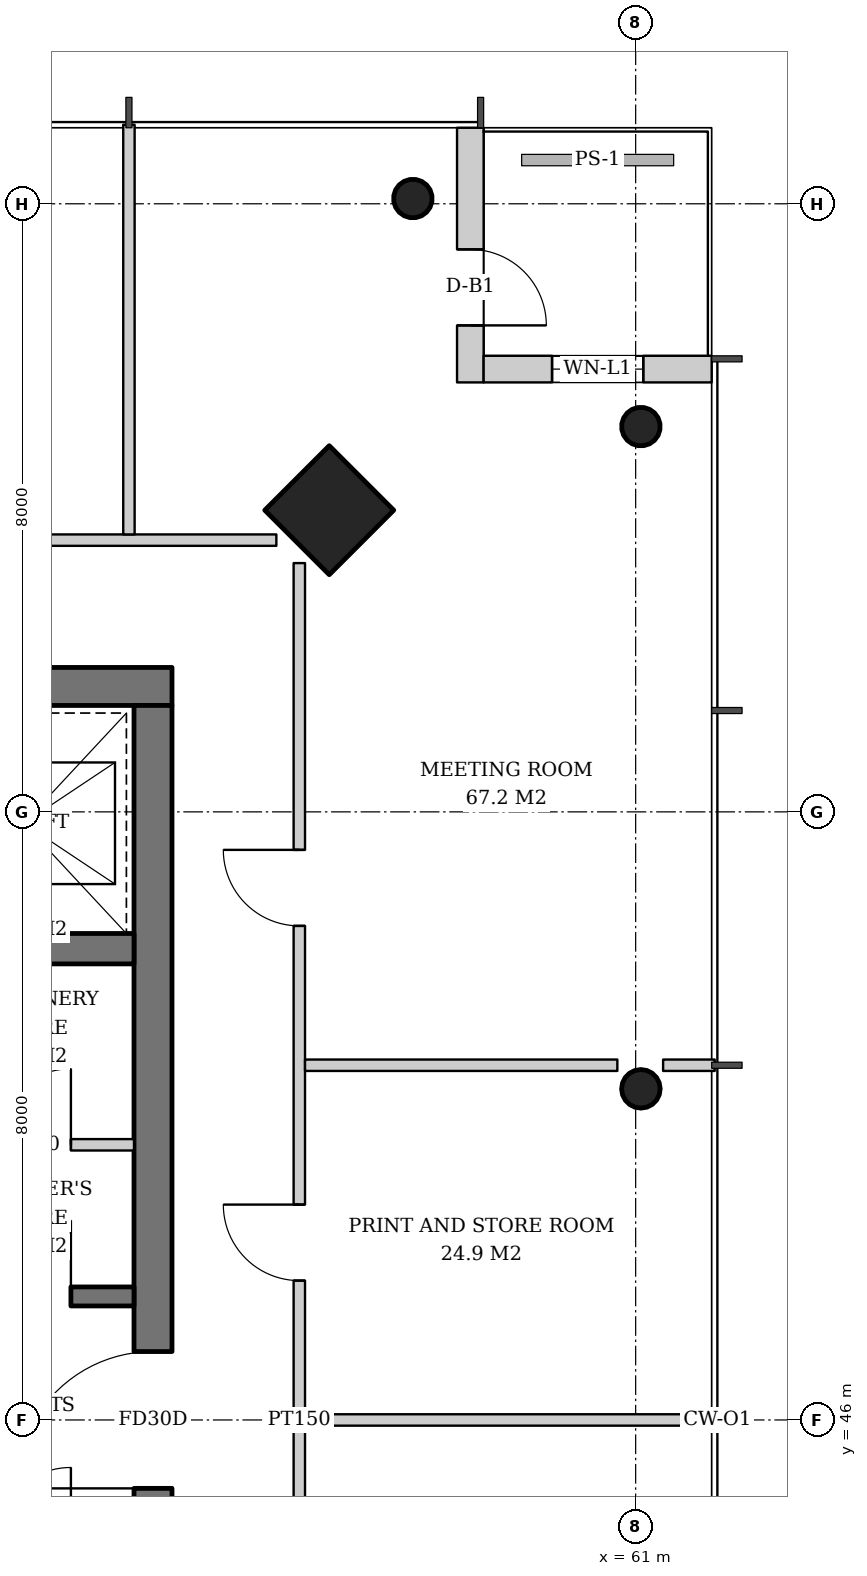
"""IFC4 building model, lengths in metres.
Left out: names, types, materials, properties, quantities, classifications, styles, units other than length and angle.
Written with IfcOpenShell. Run it as: python <this file> out.ifc"""

import sys

from ifc_helpers import new_model, si_unit, direction, frame, frame_2d, origin, origin_2d, place, context, subcontext, project, spatial, rectangle, hollow_circle, extrude, element, fill, save


model = new_model("IFC4")
c1 = context("Model", 3, precision=1e-05, world=origin(), true_north=direction((0.0, 1.0)))
c2 = subcontext(c1, "Body", "Model", "MODEL_VIEW")
j1 = project(units=[si_unit("LENGTHUNIT", "METRE"), si_unit("PLANEANGLEUNIT", "RADIAN")], contexts=[c1])
p1 = place(None, origin())
s1 = spatial("IfcSite", under=j1, at=p1, CompositionType="ELEMENT")
p2 = place(p1, origin())
s2 = spatial("IfcBuilding", under=s1, at=p2, CompositionType="ELEMENT")
p3 = place(p2, frame((0.0, 0.0, 268.0)))
s3 = spatial("IfcBuildingStorey", under=s2, at=p3, CompositionType="ELEMENT", Elevation=268.0)
p4 = place(p3, frame((57.007, 58.007, 0.0), z_axis=(-0.031898107953, -0.031898107953, 0.998981992539), x_axis=(0.707106781187, -0.707106781187, 0.0)))
e1 = element("IfcColumn", 1, at=p4, inside=s3, PredefinedType="COLUMN", context=c2, shape_type="SweptSolid", body=[
    extrude(rectangle(XDim=1.2, YDim=1.2, at=origin_2d()), origin(), (0.0, 0.0, 1.0), 3.804),
])
p5 = place(p3, frame((61.107, 59.107, 0.0), z_axis=(-0.031962158256, -0.031962158256, 0.998977898093), x_axis=(0.707106781187, -0.707106781187, 0.0)))
e2 = element("IfcColumn", 2, at=p5, inside=s3, PredefinedType="COLUMN", context=c2, shape_type="SweptSolid", body=[
    extrude(hollow_circle(Radius=0.254, WallThickness=0.02, at=origin_2d()), origin(), (0.0, 0.0, 1.0), 3.804),
])
p6 = place(p3, frame((61.107, 50.369, 0.0), z_axis=(-0.031976680097, -0.010658893366, 0.999431778523), x_axis=(0.316227766017, -0.948683298051, 0.0)))
e3 = element("IfcColumn", 3, at=p6, inside=s3, PredefinedType="COLUMN", context=c2, shape_type="SweptSolid", body=[
    extrude(hollow_circle(Radius=0.254, WallThickness=0.02, at=origin_2d()), origin(), (0.0, 0.0, 1.0), 3.802),
])
p7 = place(p3, frame((58.107, 62.107, 0.0), z_axis=(-0.031962158256, -0.031962158256, 0.998977898093), x_axis=(0.707106781187, -0.707106781187, 0.0)))
e4 = element("IfcColumn", 4, at=p7, inside=s3, PredefinedType="COLUMN", context=c2, shape_type="SweptSolid", body=[
    extrude(hollow_circle(Radius=0.254, WallThickness=0.02, at=origin_2d()), origin(), (0.0, 0.0, 1.0), 3.804),
])
p8 = place(p3, frame((35.1, 55.65, 0.0), z_axis=(0.0, 0.0, 1.0), x_axis=(1.0, 0.0, 0.0)))
e5 = element("IfcWall", 5, at=p8, inside=s3, PredefinedType="SHEAR", context=c2, shape_type="SweptSolid", body=[
    extrude(rectangle(XDim=19.8, YDim=0.5, at=frame_2d((9.9, 0.0))), origin(), (0.0, 0.0, 1.0), 3.8),
])
p9 = place(p8, frame((14.54, 0.0, 0.0)))
e6 = element("IfcOpeningElement", 6, at=p9, cuts=e5, PredefinedType="OPENING", context=c2, shape_type="SweptSolid", body=[
    extrude(rectangle(XDim=1.0, YDim=2.1, at=frame_2d((0.5, 1.05))), frame((0.0, 0.26, 0.0), z_axis=(0.0, -1.0, 0.0), x_axis=(1.0, 0.0, 0.0)), (0.0, 0.0, 1.0), 0.52),
])
p10 = place(p8, frame((1.75, 0.0, 0.0)))
e7 = element("IfcOpeningElement", 7, at=p10, cuts=e5, PredefinedType="OPENING", context=c2, shape_type="SweptSolid", body=[
    extrude(rectangle(XDim=1.0, YDim=2.1, at=frame_2d((0.5, 1.05))), frame((0.0, 0.26, 0.0), z_axis=(0.0, -1.0, 0.0), x_axis=(1.0, 0.0, 0.0)), (0.0, 0.0, 1.0), 0.52),
])
p11 = place(p8, frame((3.705, 0.0, 0.0)))
e8 = element("IfcOpeningElement", 8, at=p11, cuts=e5, PredefinedType="OPENING", context=c2, shape_type="SweptSolid", body=[
    extrude(rectangle(XDim=1.0, YDim=2.1, at=frame_2d((0.5, 1.05))), frame((0.0, 0.26, 0.0), z_axis=(0.0, -1.0, 0.0), x_axis=(1.0, 0.0, 0.0)), (0.0, 0.0, 1.0), 0.52),
])
p12 = place(p3, frame((54.65, 36.6, 0.0), z_axis=(0.0, 0.0, 1.0), x_axis=(0.0, 1.0, 0.0)))
e9 = element("IfcWall", 9, at=p12, inside=s3, PredefinedType="SHEAR", context=c2, shape_type="SweptSolid", body=[
    extrude(rectangle(XDim=18.8, YDim=0.5, at=frame_2d((9.4, 0.0))), origin(), (0.0, 0.0, 1.0), 3.8),
])
p13 = place(p12, frame((8.5, 0.0, 0.0)))
e10 = element("IfcOpeningElement", 10, at=p13, cuts=e9, PredefinedType="OPENING", context=c2, shape_type="SweptSolid", body=[
    extrude(rectangle(XDim=1.8, YDim=2.4, at=frame_2d((0.9, 1.2))), frame((0.0, 0.26, 0.0), z_axis=(0.0, -1.0, 0.0), x_axis=(1.0, 0.0, 0.0)), (0.0, 0.0, 1.0), 0.52),
])
p14 = place(p3, frame((35.6, 52.2, 0.0), z_axis=(0.0, 0.0, 1.0), x_axis=(1.0, 0.0, 0.0)))
e11 = element("IfcWall", 11, at=p14, inside=s3, PredefinedType="SHEAR", context=c2, shape_type="SweptSolid", body=[
    extrude(rectangle(XDim=18.8, YDim=0.4, at=frame_2d((9.4, 0.0))), origin(), (0.0, 0.0, 1.0), 3.8),
])
p15 = place(p3, frame((58.825, 63.0, 0.0), z_axis=(0.0, 0.0, 1.0), x_axis=(0.0, -1.0, 0.0)))
e12 = element("IfcWall", 12, at=p15, inside=s3, PredefinedType="SOLIDWALL", context=c2, shape_type="SweptSolid", body=[
    extrude(rectangle(XDim=3.35, YDim=0.35, at=frame_2d((1.675, 0.0))), origin(), (0.0, 0.0, 1.0), 3.62),
])
p16 = place(p15, frame((1.6, 0.0, 0.0)))
e13 = element("IfcOpeningElement", 13, at=p16, cuts=e12, PredefinedType="OPENING", context=c2, shape_type="SweptSolid", body=[
    extrude(rectangle(XDim=1.0, YDim=2.4, at=frame_2d((0.5, 1.2))), frame((0.0, 0.185, 0.0), z_axis=(0.0, -1.0, 0.0), x_axis=(1.0, 0.0, 0.0)), (0.0, 0.0, 1.0), 0.37),
])
p17 = place(p3, frame((59.0, 59.825, 0.0), z_axis=(0.0, 0.0, 1.0), x_axis=(1.0, 0.0, 0.0)))
e14 = element("IfcWall", 14, at=p17, inside=s3, PredefinedType="SOLIDWALL", context=c2, shape_type="SweptSolid", body=[
    extrude(rectangle(XDim=3.0, YDim=0.35, at=frame_2d((1.5, 0.0))), origin(), (0.0, 0.0, 1.0), 3.62),
])
p18 = place(p17, frame((0.9, 0.0, 0.6)))
e15 = element("IfcOpeningElement", 15, at=p18, cuts=e14, PredefinedType="OPENING", context=c2, shape_type="SweptSolid", body=[
    extrude(rectangle(XDim=1.2, YDim=2.55, at=frame_2d((0.6, 1.275))), frame((0.0, 0.185, 0.0), z_axis=(0.0, -1.0, 0.0), x_axis=(1.0, 0.0, 0.0)), (0.0, 0.0, 1.0), 0.37),
])
p19 = place(p3, frame((48.93, 47.625, 0.0), z_axis=(0.0, 0.0, 1.0), x_axis=(1.0, 0.0, 0.0)))
e16 = element("IfcWall", 16, at=p19, inside=s3, PredefinedType="SHEAR", context=c2, shape_type="SweptSolid", body=[
    extrude(rectangle(XDim=5.47, YDim=0.25, at=frame_2d((2.735, 0.0))), origin(), (0.0, 0.0, 1.0), 3.8),
])
p20 = place(p19, frame((0.78, 0.0, 0.0)))
e17 = element("IfcOpeningElement", 17, at=p20, cuts=e16, PredefinedType="OPENING", context=c2, shape_type="SweptSolid", body=[
    extrude(rectangle(XDim=1.0, YDim=2.1, at=frame_2d((0.5, 1.05))), frame((0.0, 0.135, 0.0), z_axis=(0.0, -1.0, 0.0), x_axis=(1.0, 0.0, 0.0)), (0.0, 0.0, 1.0), 0.27),
])
p21 = place(p19, frame((3.64, 0.0, 0.0)))
e18 = element("IfcOpeningElement", 18, at=p21, cuts=e16, PredefinedType="OPENING", context=c2, shape_type="SweptSolid", body=[
    extrude(rectangle(XDim=1.0, YDim=2.1, at=frame_2d((0.5, 1.05))), frame((0.0, 0.135, 0.0), z_axis=(0.0, -1.0, 0.0), x_axis=(1.0, 0.0, 0.0)), (0.0, 0.0, 1.0), 0.27),
])
p22 = place(p3, frame((51.74, 49.62, 0.0), z_axis=(0.0, 0.0, 1.0), x_axis=(1.0, 0.0, 0.0)))
e19 = element("IfcWall", 19, at=p22, inside=s3, PredefinedType="SOLIDWALL", context=c2, shape_type="SweptSolid", body=[
    extrude(rectangle(XDim=2.66, YDim=0.15, at=frame_2d((1.33, 0.0))), origin(), (0.0, 0.0, 1.0), 3.62),
])
p23 = place(p22, frame((0.83, 0.0, 0.0)))
e20 = element("IfcOpeningElement", 20, at=p23, cuts=e19, PredefinedType="OPENING", context=c2, shape_type="SweptSolid", body=[
    extrude(rectangle(XDim=1.0, YDim=2.1, at=frame_2d((0.5, 1.05))), frame((0.0, 0.085, 0.0), z_axis=(0.0, -1.0, 0.0), x_axis=(1.0, 0.0, 0.0)), (0.0, 0.0, 1.0), 0.17),
])
p24 = place(p3, frame((56.575, 34.727, 0.0), z_axis=(0.0, 0.0, 1.0), x_axis=(0.0, 1.0, 0.0)))
e21 = element("IfcWall", 21, at=p24, inside=s3, PredefinedType="PARTITIONING", context=c2, shape_type="SweptSolid", body=[
    extrude(rectangle(XDim=22.546, YDim=0.15, at=frame_2d((11.273, 0.0))), origin(), (0.0, 0.0, 1.0), 3.02),
])
p25 = place(p24, frame((3.773, 0.0, 0.0)))
e22 = element("IfcOpeningElement", 22, at=p25, cuts=e21, PredefinedType="OPENING", context=c2, shape_type="SweptSolid", body=[
    extrude(rectangle(XDim=1.0, YDim=2.1, at=frame_2d((0.5, 1.05))), frame((0.0, 0.085, 0.0), z_axis=(0.0, -1.0, 0.0), x_axis=(1.0, 0.0, 0.0)), (0.0, 0.0, 1.0), 0.17),
])
p26 = place(p24, frame((8.439, 0.0, 0.0)))
e23 = element("IfcOpeningElement", 23, at=p26, cuts=e21, PredefinedType="OPENING", context=c2, shape_type="SweptSolid", body=[
    extrude(rectangle(XDim=1.0, YDim=2.1, at=frame_2d((0.5, 1.05))), frame((0.0, 0.085, 0.0), z_axis=(0.0, -1.0, 0.0), x_axis=(1.0, 0.0, 0.0)), (0.0, 0.0, 1.0), 0.17),
])
p27 = place(p24, frame((13.106, 0.0, 0.0)))
e24 = element("IfcOpeningElement", 24, at=p27, cuts=e21, PredefinedType="OPENING", context=c2, shape_type="SweptSolid", body=[
    extrude(rectangle(XDim=1.0, YDim=2.1, at=frame_2d((0.5, 1.05))), frame((0.0, 0.085, 0.0), z_axis=(0.0, -1.0, 0.0), x_axis=(1.0, 0.0, 0.0)), (0.0, 0.0, 1.0), 0.17),
])
p28 = place(p24, frame((17.773, 0.0, 0.0)))
e25 = element("IfcOpeningElement", 25, at=p28, cuts=e21, PredefinedType="OPENING", context=c2, shape_type="SweptSolid", body=[
    extrude(rectangle(XDim=1.0, YDim=2.1, at=frame_2d((0.5, 1.05))), frame((0.0, 0.085, 0.0), z_axis=(0.0, -1.0, 0.0), x_axis=(1.0, 0.0, 0.0)), (0.0, 0.0, 1.0), 0.17),
])
p29 = place(p3, frame((56.65, 46.0, 0.0), z_axis=(0.0, 0.0, 1.0), x_axis=(1.0, 0.0, 0.0)))
e26 = element("IfcWall", 26, at=p29, inside=s3, PredefinedType="PARTITIONING", context=c2, shape_type="SweptSolid", body=[
    extrude(rectangle(XDim=5.39, YDim=0.15, at=frame_2d((2.695, 0.0))), origin(), (0.0, 0.0, 1.0), 3.12),
])
p30 = place(p3, frame((56.65, 50.667, 0.0), z_axis=(0.0, 0.0, 1.0), x_axis=(1.0, 0.0, 0.0)))
e27 = element("IfcWall", 27, at=p30, inside=s3, PredefinedType="PARTITIONING", context=c2, shape_type="SweptSolid", body=[
    extrude(rectangle(XDim=4.109, YDim=0.15, at=frame_2d((2.055, 0.0))), origin(), (0.0, 0.0, 1.0), 3.62),
])
p31 = place(p3, frame((61.361, 50.667, 0.0), z_axis=(0.0, 0.0, 1.0), x_axis=(1.0, 0.0, 0.0)))
e28 = element("IfcWall", 28, at=p31, inside=s3, PredefinedType="PARTITIONING", context=c2, shape_type="SweptSolid", body=[
    extrude(rectangle(XDim=0.679, YDim=0.15, at=frame_2d((0.339, 0.0))), origin(), (0.0, 0.0, 1.0), 3.62),
])
p32 = place(p3, frame((56.273, 57.575, 0.0), z_axis=(0.0, 0.0, 1.0), x_axis=(-1.0, 0.0, 0.0)))
e29 = element("IfcWall", 29, at=p32, inside=s3, PredefinedType="PARTITIONING", context=c2, shape_type="SweptSolid", body=[
    extrude(rectangle(XDim=22.546, YDim=0.15, at=frame_2d((11.273, 0.0))), origin(), (0.0, 0.0, 1.0), 3.02),
])
p33 = place(p32, frame((3.773, 0.0, 0.0)))
e30 = element("IfcOpeningElement", 30, at=p33, cuts=e29, PredefinedType="OPENING", context=c2, shape_type="SweptSolid", body=[
    extrude(rectangle(XDim=1.0, YDim=2.1, at=frame_2d((0.5, 1.05))), frame((0.0, 0.085, 0.0), z_axis=(0.0, -1.0, 0.0), x_axis=(1.0, 0.0, 0.0)), (0.0, 0.0, 1.0), 0.17),
])
p34 = place(p32, frame((8.04, 0.0, 0.0)))
e31 = element("IfcOpeningElement", 31, at=p34, cuts=e29, PredefinedType="OPENING", context=c2, shape_type="SweptSolid", body=[
    extrude(rectangle(XDim=1.8, YDim=2.4, at=frame_2d((0.9, 1.2))), frame((0.0, 0.085, 0.0), z_axis=(0.0, -1.0, 0.0), x_axis=(1.0, 0.0, 0.0)), (0.0, 0.0, 1.0), 0.17),
])
p35 = place(p32, frame((17.773, 0.0, 0.0)))
e32 = element("IfcOpeningElement", 32, at=p35, cuts=e29, PredefinedType="OPENING", context=c2, shape_type="SweptSolid", body=[
    extrude(rectangle(XDim=1.0, YDim=2.1, at=frame_2d((0.5, 1.05))), frame((0.0, 0.085, 0.0), z_axis=(0.0, -1.0, 0.0), x_axis=(1.0, 0.0, 0.0)), (0.0, 0.0, 1.0), 0.17),
])
p36 = place(p3, frame((54.333, 57.65, 0.0), z_axis=(0.0, 0.0, 1.0), x_axis=(0.0, 1.0, 0.0)))
e33 = element("IfcWall", 33, at=p36, inside=s3, PredefinedType="PARTITIONING", context=c2, shape_type="SweptSolid", body=[
    extrude(rectangle(XDim=5.39, YDim=0.15, at=frame_2d((2.695, 0.0))), origin(), (0.0, 0.0, 1.0), 3.12),
])
p37 = place(p16, origin())
e34 = element("IfcDoor", 34, at=p37, inside=s3, OperationType="SINGLE_SWING_RIGHT", PredefinedType="DOOR", context=c2, shape_type="SweptSolid", body=[
    extrude(rectangle(XDim=1.0, YDim=2.4, at=frame_2d((0.5, 1.2))), frame((0.0, 0.025, 0.0), z_axis=(0.0, -1.0, 0.0), x_axis=(1.0, 0.0, 0.0)), (0.0, 0.0, 1.0), 0.05),
])
fill(e13, e34)
p38 = place(p18, origin())
e35 = element("IfcWindow", 35, at=p38, inside=s3, PartitioningType="SINGLE_PANEL", PredefinedType="WINDOW", context=c2, shape_type="SweptSolid", body=[
    extrude(rectangle(XDim=1.2, YDim=2.55, at=frame_2d((0.6, 1.275))), frame((0.0, 0.03, 0.0), z_axis=(0.0, -1.0, 0.0), x_axis=(1.0, 0.0, 0.0)), (0.0, 0.0, 1.0), 0.06),
])
fill(e15, e35)
p39 = place(p21, origin())
e36 = element("IfcDoor", 36, at=p39, inside=s3, OperationType="SINGLE_SWING_RIGHT", PredefinedType="DOOR", context=c2, shape_type="SweptSolid", body=[
    extrude(rectangle(XDim=1.0, YDim=2.1, at=frame_2d((0.5, 1.05))), frame((0.0, 0.025, 0.0), z_axis=(0.0, -1.0, 0.0), x_axis=(1.0, 0.0, 0.0)), (0.0, 0.0, 1.0), 0.05),
])
fill(e18, e36)
p40 = place(p23, origin())
e37 = element("IfcDoor", 37, at=p40, inside=s3, OperationType="SINGLE_SWING_RIGHT", PredefinedType="DOOR", context=c2, shape_type="SweptSolid", body=[
    extrude(rectangle(XDim=1.0, YDim=2.1, at=frame_2d((0.5, 1.05))), frame((0.0, 0.025, 0.0), z_axis=(0.0, -1.0, 0.0), x_axis=(1.0, 0.0, 0.0)), (0.0, 0.0, 1.0), 0.05),
])
fill(e20, e37)
p41 = place(p13, origin())
e38 = element("IfcDoor", 38, at=p41, inside=s3, OperationType="DOUBLE_DOOR_SINGLE_SWING", PredefinedType="DOOR", context=c2, shape_type="SweptSolid", body=[
    extrude(rectangle(XDim=1.8, YDim=2.4, at=frame_2d((0.9, 1.2))), frame((0.0, 0.025, 0.0), z_axis=(0.0, -1.0, 0.0), x_axis=(1.0, 0.0, 0.0)), (0.0, 0.0, 1.0), 0.05),
])
fill(e10, e38)
p42 = place(p27, origin())
e39 = element("IfcDoor", 39, at=p42, inside=s3, OperationType="SINGLE_SWING_RIGHT", PredefinedType="DOOR", context=c2, shape_type="SweptSolid", body=[
    extrude(rectangle(XDim=1.0, YDim=2.1, at=frame_2d((0.5, 1.05))), frame((0.0, 0.025, 0.0), z_axis=(0.0, -1.0, 0.0), x_axis=(1.0, 0.0, 0.0)), (0.0, 0.0, 1.0), 0.05),
])
fill(e24, e39)
p43 = place(p28, origin())
e40 = element("IfcDoor", 40, at=p43, inside=s3, OperationType="SINGLE_SWING_RIGHT", PredefinedType="DOOR", context=c2, shape_type="SweptSolid", body=[
    extrude(rectangle(XDim=1.0, YDim=2.1, at=frame_2d((0.5, 1.05))), frame((0.0, 0.025, 0.0), z_axis=(0.0, -1.0, 0.0), x_axis=(1.0, 0.0, 0.0)), (0.0, 0.0, 1.0), 0.05),
])
fill(e25, e40)
save(model, sys.argv[1])
